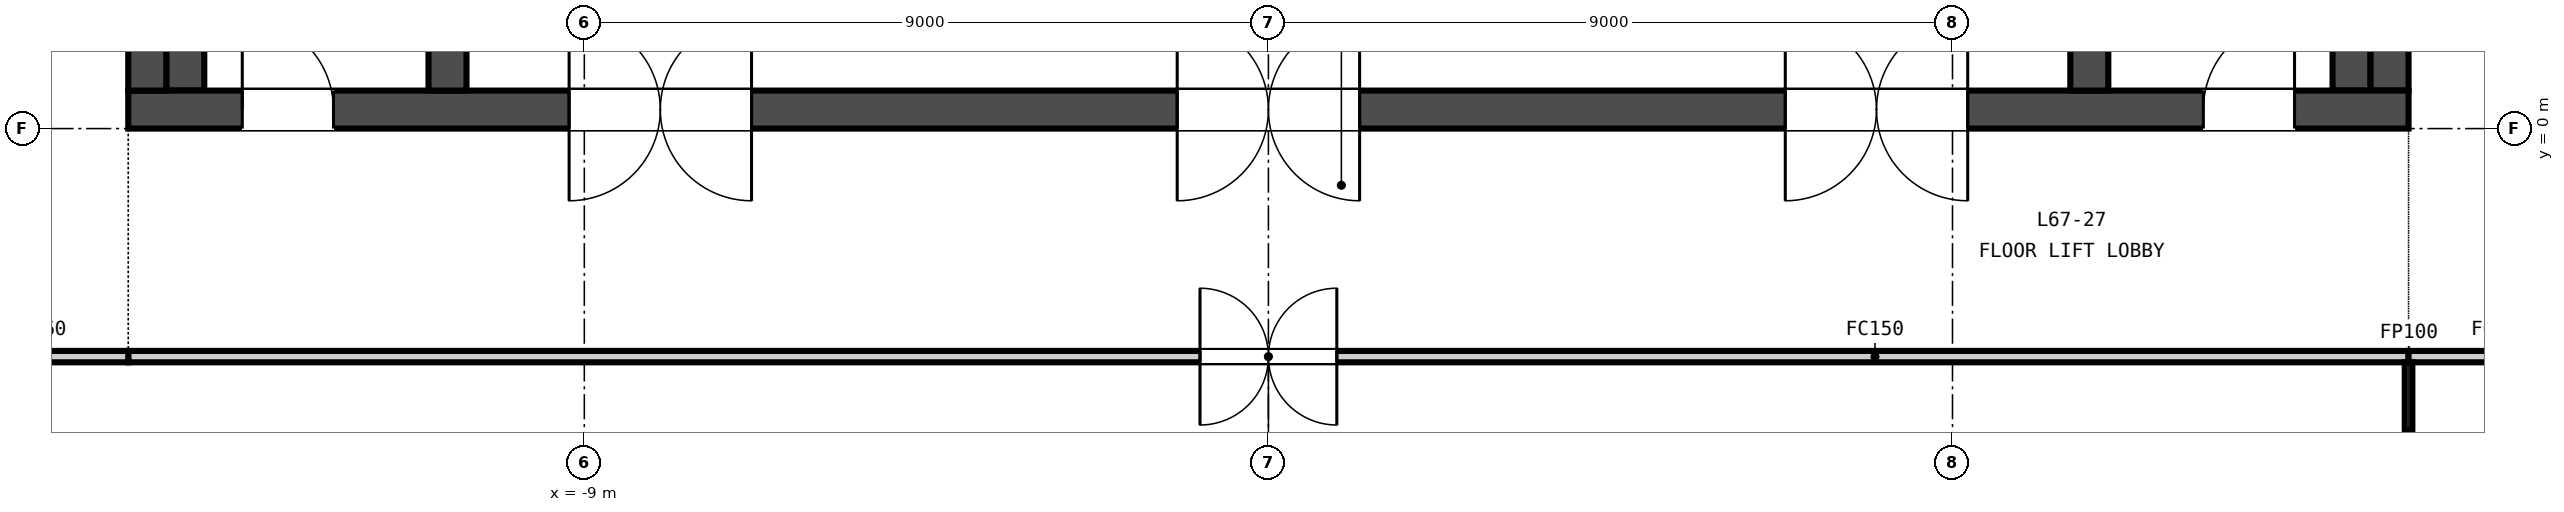
"""IFC4 building model, lengths in metres.
Left out: names, types, materials, properties, quantities, classifications, styles, units other than length and angle.
Written with IfcOpenShell. Run it as: python <this file> out.ifc"""

import sys

from ifc_helpers import new_model, si_unit, direction, frame, frame_2d, origin, place, context, subcontext, project, spatial, rectangle, extrude, element, fill, save


model = new_model("IFC4")
c1 = context("Model", 3, precision=1e-05, world=origin(), true_north=direction((0.0, 1.0)))
c2 = subcontext(c1, "Body", "Model", "MODEL_VIEW")
j1 = project(units=[si_unit("LENGTHUNIT", "METRE"), si_unit("PLANEANGLEUNIT", "RADIAN")], contexts=[c1])
p1 = place(None, origin())
s1 = spatial("IfcSite", under=j1, at=p1, CompositionType="ELEMENT")
p2 = place(p1, origin())
s2 = spatial("IfcBuilding", under=s1, at=p2, CompositionType="ELEMENT")
p3 = place(p2, frame((0.0, 0.0, 264.6)))
s3 = spatial("IfcBuildingStorey", under=s2, at=p3, CompositionType="ELEMENT", Elevation=264.6)
p4 = place(p3, frame((-15.0, 0.25, -0.15), z_axis=(0.0, 0.0, 1.0), x_axis=(1.0, 0.0, 0.0)))
e1 = element("IfcWall", 1, at=p4, inside=s3, PredefinedType="SOLIDWALL", context=c2, shape_type="SweptSolid", body=[
    extrude(rectangle(XDim=30.0, YDim=0.5, at=frame_2d((15.0, 0.0))), origin(), (0.0, 0.0, 1.0), 3.65),
])
p5 = place(p4, frame((5.8, 0.0, 0.15)))
e2 = element("IfcOpeningElement", 2, at=p5, cuts=e1, PredefinedType="OPENING", context=c2, shape_type="SweptSolid", body=[
    extrude(rectangle(XDim=2.4, YDim=2.4, at=frame_2d((1.2, 1.2))), frame((0.0, 0.26, 0.0), z_axis=(0.0, -1.0, 0.0), x_axis=(1.0, 0.0, 0.0)), (0.0, 0.0, 1.0), 0.52),
])
p6 = place(p4, frame((13.8, 0.0, 0.15)))
e3 = element("IfcOpeningElement", 3, at=p6, cuts=e1, PredefinedType="OPENING", context=c2, shape_type="SweptSolid", body=[
    extrude(rectangle(XDim=2.4, YDim=2.4, at=frame_2d((1.2, 1.2))), frame((0.0, 0.26, 0.0), z_axis=(0.0, -1.0, 0.0), x_axis=(1.0, 0.0, 0.0)), (0.0, 0.0, 1.0), 0.52),
])
p7 = place(p4, frame((21.8, 0.0, 0.15)))
e4 = element("IfcOpeningElement", 4, at=p7, cuts=e1, PredefinedType="OPENING", context=c2, shape_type="SweptSolid", body=[
    extrude(rectangle(XDim=2.4, YDim=2.4, at=frame_2d((1.2, 1.2))), frame((0.0, 0.26, 0.0), z_axis=(0.0, -1.0, 0.0), x_axis=(1.0, 0.0, 0.0)), (0.0, 0.0, 1.0), 0.52),
])
p8 = place(p4, frame((1.5, 0.0, 0.15)))
e5 = element("IfcOpeningElement", 5, at=p8, cuts=e1, PredefinedType="OPENING", context=c2, shape_type="SweptSolid", body=[
    extrude(rectangle(XDim=1.2, YDim=2.1, at=frame_2d((0.6, 1.05))), frame((0.0, 0.26, 0.0), z_axis=(0.0, -1.0, 0.0), x_axis=(1.0, 0.0, 0.0)), (0.0, 0.0, 1.0), 0.52),
])
p9 = place(p4, frame((27.3, 0.0, 0.15)))
e6 = element("IfcOpeningElement", 6, at=p9, cuts=e1, PredefinedType="OPENING", context=c2, shape_type="SweptSolid", body=[
    extrude(rectangle(XDim=1.2, YDim=2.1, at=frame_2d((0.6, 1.05))), frame((0.0, 0.26, 0.0), z_axis=(0.0, -1.0, 0.0), x_axis=(1.0, 0.0, 0.0)), (0.0, 0.0, 1.0), 0.52),
])
for number, where, z_axis, x_axis in (
    (7, (-14.75, 0.5, -0.15), (0.0, 0.0, 1.0), (0.0, 1.0, 0.0)),
    (8, (14.75, 0.5, -0.15), (0.0, 0.0, 1.0), (0.0, 1.0, 0.0)),
    (9, (-10.8, 0.5, -0.15), (0.0, 0.0, 1.0), (0.0, 1.0, 0.0)),
    (10, (10.8, 0.5, -0.15), (0.0, 0.0, 1.0), (0.0, 1.0, 0.0)),
):
    element("IfcWall", number, at=place(p3, frame(where, z_axis=z_axis, x_axis=x_axis)), inside=s3, PredefinedType="SOLIDWALL", context=c2, shape_type="SweptSolid", body=[
        extrude(rectangle(XDim=14.0, YDim=0.5, at=frame_2d((7.0, 0.0))), origin(), (0.0, 0.0, 1.0), 3.65),
    ])
for number, where, z_axis, x_axis in (
    (11, (-14.25, 0.5, 0.0), (0.0, 0.0, 1.0), (0.0, 1.0, 0.0)),
    (12, (14.25, 0.5, 0.0), (0.0, 0.0, 1.0), (0.0, 1.0, 0.0)),
):
    element("IfcWall", number, at=place(p3, frame(where, z_axis=z_axis, x_axis=x_axis)), inside=s3, PredefinedType="SOLIDWALL", context=c2, shape_type="SweptSolid", body=[
        extrude(rectangle(XDim=14.0, YDim=0.5, at=frame_2d((7.0, 0.0))), origin(), (0.0, 0.0, 1.0), 3.5),
    ])
p10 = place(p3, frame((15.0, -3.0, 0.0), z_axis=(0.0, 0.0, 1.0), x_axis=(-1.0, 0.0, 0.0)))
e13 = element("IfcWall", 13, at=p10, inside=s3, PredefinedType="PARTITIONING", context=c2, shape_type="SweptSolid", body=[
    extrude(rectangle(XDim=30.0, YDim=0.15, at=frame_2d((15.0, 0.0))), origin(), (0.0, 0.0, 1.0), 2.75),
])
p11 = place(p10, frame((14.1, 0.0, 0.0)))
e14 = element("IfcOpeningElement", 14, at=p11, cuts=e13, PredefinedType="OPENING", context=c2, shape_type="SweptSolid", body=[
    extrude(rectangle(XDim=1.8, YDim=2.1, at=frame_2d((0.9, 1.05))), frame((0.0, 0.085, 0.0), z_axis=(0.0, -1.0, 0.0), x_axis=(1.0, 0.0, 0.0)), (0.0, 0.0, 1.0), 0.17),
])
for number, where, z_axis, x_axis in (
    (15, (-15.0, -3.0, 0.0), (0.0, 0.0, 1.0), (-1.0, 0.0, 0.0)),
    (16, (17.4, -3.0, 0.0), (0.0, 0.0, 1.0), (-1.0, 0.0, 0.0)),
):
    element("IfcWall", number, at=place(p3, frame(where, z_axis=z_axis, x_axis=x_axis)), inside=s3, PredefinedType="PARTITIONING", context=c2, shape_type="SweptSolid", body=[
        extrude(rectangle(XDim=2.4, YDim=0.15, at=frame_2d((1.2, 0.0))), origin(), (0.0, 0.0, 1.0), 2.75),
    ])
p12 = place(p3, frame((15.0, -4.895, 0.0), z_axis=(0.0, 0.0, 1.0), x_axis=(0.0, 1.0, 0.0)))
e17 = element("IfcWall", 17, at=p12, inside=s3, PredefinedType="PARTITIONING", context=c2, shape_type="SweptSolid", body=[
    extrude(rectangle(XDim=1.82, YDim=0.1, at=frame_2d((0.91, 0.0))), origin(), (0.0, 0.0, 1.0), 2.75),
])
p13 = place(p5, origin())
e18 = element("IfcDoor", 18, at=p13, inside=s3, OperationType="DOUBLE_DOOR_DOUBLE_SWING", PredefinedType="DOOR", context=c2, shape_type="SweptSolid", body=[
    extrude(rectangle(XDim=2.4, YDim=2.4, at=frame_2d((1.2, 1.2))), frame((0.0, 0.025, 0.0), z_axis=(0.0, -1.0, 0.0), x_axis=(1.0, 0.0, 0.0)), (0.0, 0.0, 1.0), 0.05),
])
fill(e2, e18)
p14 = place(p6, origin())
e19 = element("IfcDoor", 19, at=p14, inside=s3, OperationType="DOUBLE_DOOR_DOUBLE_SWING", PredefinedType="DOOR", context=c2, shape_type="SweptSolid", body=[
    extrude(rectangle(XDim=2.4, YDim=2.4, at=frame_2d((1.2, 1.2))), frame((0.0, 0.025, 0.0), z_axis=(0.0, -1.0, 0.0), x_axis=(1.0, 0.0, 0.0)), (0.0, 0.0, 1.0), 0.05),
])
fill(e3, e19)
p15 = place(p7, origin())
e20 = element("IfcDoor", 20, at=p15, inside=s3, OperationType="DOUBLE_DOOR_DOUBLE_SWING", PredefinedType="DOOR", context=c2, shape_type="SweptSolid", body=[
    extrude(rectangle(XDim=2.4, YDim=2.4, at=frame_2d((1.2, 1.2))), frame((0.0, 0.025, 0.0), z_axis=(0.0, -1.0, 0.0), x_axis=(1.0, 0.0, 0.0)), (0.0, 0.0, 1.0), 0.05),
])
fill(e4, e20)
p16 = place(p8, origin())
e21 = element("IfcDoor", 21, at=p16, inside=s3, OperationType="SINGLE_SWING_LEFT", PredefinedType="DOOR", context=c2, shape_type="SweptSolid", body=[
    extrude(rectangle(XDim=1.2, YDim=2.1, at=frame_2d((0.6, 1.05))), frame((0.0, 0.025, 0.0), z_axis=(0.0, -1.0, 0.0), x_axis=(1.0, 0.0, 0.0)), (0.0, 0.0, 1.0), 0.05),
])
fill(e5, e21)
p17 = place(p9, origin())
e22 = element("IfcDoor", 22, at=p17, inside=s3, OperationType="SINGLE_SWING_RIGHT", PredefinedType="DOOR", context=c2, shape_type="SweptSolid", body=[
    extrude(rectangle(XDim=1.2, YDim=2.1, at=frame_2d((0.6, 1.05))), frame((0.0, 0.025, 0.0), z_axis=(0.0, -1.0, 0.0), x_axis=(1.0, 0.0, 0.0)), (0.0, 0.0, 1.0), 0.05),
])
fill(e6, e22)
p18 = place(p11, origin())
e23 = element("IfcDoor", 23, at=p18, inside=s3, OperationType="DOUBLE_DOOR_DOUBLE_SWING", PredefinedType="DOOR", context=c2, shape_type="SweptSolid", body=[
    extrude(rectangle(XDim=1.8, YDim=2.1, at=frame_2d((0.9, 1.05))), frame((0.0, 0.025, 0.0), z_axis=(0.0, -1.0, 0.0), x_axis=(1.0, 0.0, 0.0)), (0.0, 0.0, 1.0), 0.05),
])
fill(e14, e23)
save(model, sys.argv[1])
